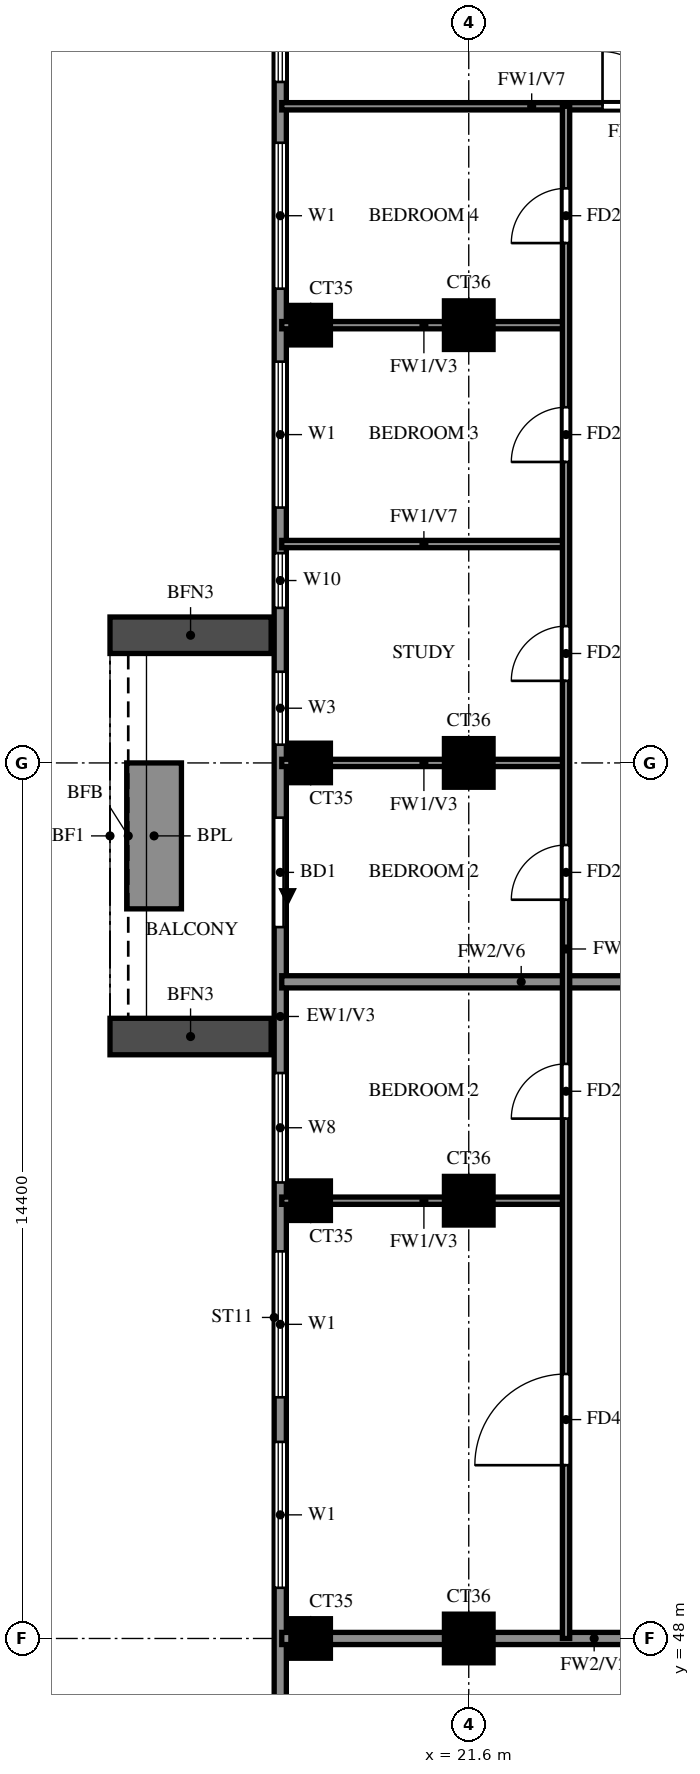
"""IFC4 building model, lengths in metres.
Left out: names, types, materials, properties, quantities, classifications, styles, units other than length and angle.
Written with IfcOpenShell. Run it as: python <this file> out.ifc"""

import sys

from ifc_helpers import new_model, si_unit, direction, frame, frame_2d, origin, origin_2d, place, context, subcontext, project, spatial, rectangle, extrude, source, transform, mapped, element, fill, save


model = new_model("IFC4")
c1 = context("Model", 3, precision=1e-05, world=origin(), true_north=direction((0.0, 1.0)))
c2 = subcontext(c1, "Body", "Model", "MODEL_VIEW")
j1 = project(units=[si_unit("LENGTHUNIT", "METRE"), si_unit("PLANEANGLEUNIT", "RADIAN")], contexts=[c1])
p1 = place(None, origin())
s1 = spatial("IfcSite", under=j1, at=p1, CompositionType="ELEMENT")
p2 = place(p1, origin())
s2 = spatial("IfcBuilding", under=s1, at=p2, CompositionType="ELEMENT")
p3 = place(p2, frame((0.0, 0.0, 232.5)))
s3 = spatial("IfcBuildingStorey", under=s2, at=p3, CompositionType="ELEMENT", Elevation=232.5)
m1 = source(origin(), c2, "Body", "SweptSolid", [
    extrude(rectangle(XDim=0.65, YDim=0.65, at=origin_2d()), origin(), (0.0, 0.0, 1.0), 3.22),
])
p4 = place(p3, frame((19.0, 48.0, 0.0), z_axis=(0.0, 0.0, 1.0), x_axis=(1.0, 0.0, 0.0)))
e1 = element("IfcColumn", 1, at=p4, inside=s3, PredefinedType="COLUMN", context=c2, shape_type="MappedRepresentation", body=[
    mapped(m1, transform((0.0, 0.0, 0.0))),
])
m2 = source(origin(), c2, "Body", "SweptSolid", [
    extrude(rectangle(XDim=0.8, YDim=0.8, at=origin_2d()), origin(), (0.0, 0.0, 1.0), 3.22),
])
p5 = place(p3, frame((21.6, 48.0, 0.0), z_axis=(0.0, 0.0, 1.0), x_axis=(1.0, 0.0, 0.0)))
e2 = element("IfcColumn", 2, at=p5, inside=s3, PredefinedType="COLUMN", context=c2, shape_type="MappedRepresentation", body=[
    mapped(m2, transform((0.0, 0.0, 0.0))),
])
p6 = place(p3, frame((19.0, 55.2, 0.0), z_axis=(0.0, 0.0, 1.0), x_axis=(1.0, 0.0, 0.0)))
e3 = element("IfcColumn", 3, at=p6, inside=s3, PredefinedType="COLUMN", context=c2, shape_type="MappedRepresentation", body=[
    mapped(m1, transform((0.0, 0.0, 0.0))),
])
p7 = place(p3, frame((21.6, 55.2, 0.0), z_axis=(0.0, 0.0, 1.0), x_axis=(1.0, 0.0, 0.0)))
e4 = element("IfcColumn", 4, at=p7, inside=s3, PredefinedType="COLUMN", context=c2, shape_type="MappedRepresentation", body=[
    mapped(m2, transform((0.0, 0.0, 0.0))),
])
p8 = place(p3, frame((19.0, 62.4, 0.0), z_axis=(0.0, 0.0, 1.0), x_axis=(1.0, 0.0, 0.0)))
e5 = element("IfcColumn", 5, at=p8, inside=s3, PredefinedType="COLUMN", context=c2, shape_type="MappedRepresentation", body=[
    mapped(m1, transform((0.0, 0.0, 0.0))),
])
p9 = place(p3, frame((21.6, 62.4, 0.0), z_axis=(0.0, 0.0, 1.0), x_axis=(1.0, 0.0, 0.0)))
e6 = element("IfcColumn", 6, at=p9, inside=s3, PredefinedType="COLUMN", context=c2, shape_type="MappedRepresentation", body=[
    mapped(m2, transform((0.0, 0.0, 0.0))),
])
p10 = place(p3, frame((19.0, 69.6, 0.0), z_axis=(0.0, 0.0, 1.0), x_axis=(1.0, 0.0, 0.0)))
e7 = element("IfcColumn", 7, at=p10, inside=s3, PredefinedType="COLUMN", context=c2, shape_type="MappedRepresentation", body=[
    mapped(m1, transform((0.0, 0.0, 0.0))),
])
p11 = place(p3, frame((21.6, 69.6, 0.0), z_axis=(0.0, 0.0, 1.0), x_axis=(1.0, 0.0, 0.0)))
e8 = element("IfcColumn", 8, at=p11, inside=s3, PredefinedType="COLUMN", context=c2, shape_type="MappedRepresentation", body=[
    mapped(m2, transform((0.0, 0.0, 0.0))),
])
p12 = place(p3, frame((18.5, 76.6, 0.0), z_axis=(0.0, 0.0, 1.0), x_axis=(0.0, -1.0, 0.0)))
e9 = element("IfcWall", 9, at=p12, inside=s3, PredefinedType="SOLIDWALL", context=c2, shape_type="SweptSolid", body=[
    extrude(rectangle(XDim=33.4, YDim=0.2, at=frame_2d((16.7, 0.0))), origin(), (0.0, 0.0, 1.0), 3.22),
])
p13 = place(p12, frame((15.1, 0.0, 0.0)))
e10 = element("IfcOpeningElement", 10, at=p13, cuts=e9, PredefinedType="OPENING", context=c2, shape_type="SweptSolid", body=[
    extrude(rectangle(XDim=1.8, YDim=2.4, at=frame_2d((0.9, 1.2))), frame((0.0, 0.11, 0.0), z_axis=(0.0, -1.0, 0.0), x_axis=(1.0, 0.0, 0.0)), (0.0, 0.0, 1.0), 0.22),
])
p14 = place(p12, frame((29.7, 0.0, 0.6)))
e11 = element("IfcOpeningElement", 11, at=p14, cuts=e9, PredefinedType="OPENING", context=c2, shape_type="SweptSolid", body=[
    extrude(rectangle(XDim=2.4, YDim=2.4, at=frame_2d((1.2, 1.2))), frame((0.0, 0.11, 0.0), z_axis=(0.0, -1.0, 0.0), x_axis=(1.0, 0.0, 0.0)), (0.0, 0.0, 1.0), 0.22),
])
p15 = place(p12, frame((22.233, 0.0, 0.6)))
e12 = element("IfcOpeningElement", 12, at=p15, cuts=e9, PredefinedType="OPENING", context=c2, shape_type="SweptSolid", body=[
    extrude(rectangle(XDim=2.4, YDim=2.4, at=frame_2d((1.2, 1.2))), frame((0.0, 0.11, 0.0), z_axis=(0.0, -1.0, 0.0), x_axis=(1.0, 0.0, 0.0)), (0.0, 0.0, 1.0), 0.22),
])
p16 = place(p12, frame((25.367, 0.0, 0.6)))
e13 = element("IfcOpeningElement", 13, at=p16, cuts=e9, PredefinedType="OPENING", context=c2, shape_type="SweptSolid", body=[
    extrude(rectangle(XDim=2.4, YDim=2.4, at=frame_2d((1.2, 1.2))), frame((0.0, 0.11, 0.0), z_axis=(0.0, -1.0, 0.0), x_axis=(1.0, 0.0, 0.0)), (0.0, 0.0, 1.0), 0.22),
])
p17 = place(p12, frame((19.3, 0.0, 0.6)))
e14 = element("IfcOpeningElement", 14, at=p17, cuts=e9, PredefinedType="OPENING", context=c2, shape_type="SweptSolid", body=[
    extrude(rectangle(XDim=1.8, YDim=2.4, at=frame_2d((0.9, 1.2))), frame((0.0, 0.11, 0.0), z_axis=(0.0, -1.0, 0.0), x_axis=(1.0, 0.0, 0.0)), (0.0, 0.0, 1.0), 0.22),
])
p18 = place(p12, frame((10.75, 0.0, 0.6)))
e15 = element("IfcOpeningElement", 15, at=p18, cuts=e9, PredefinedType="OPENING", context=c2, shape_type="SweptSolid", body=[
    extrude(rectangle(XDim=0.9, YDim=2.4, at=frame_2d((0.45, 1.2))), frame((0.0, 0.11, 0.0), z_axis=(0.0, -1.0, 0.0), x_axis=(1.0, 0.0, 0.0)), (0.0, 0.0, 1.0), 0.22),
])
p19 = place(p12, frame((12.7, 0.0, 0.6)))
e16 = element("IfcOpeningElement", 16, at=p19, cuts=e9, PredefinedType="OPENING", context=c2, shape_type="SweptSolid", body=[
    extrude(rectangle(XDim=1.2, YDim=2.4, at=frame_2d((0.6, 1.2))), frame((0.0, 0.11, 0.0), z_axis=(0.0, -1.0, 0.0), x_axis=(1.0, 0.0, 0.0)), (0.0, 0.0, 1.0), 0.22),
])
p20 = place(p12, frame((7.6, 0.0, 0.6)))
e17 = element("IfcOpeningElement", 17, at=p20, cuts=e9, PredefinedType="OPENING", context=c2, shape_type="SweptSolid", body=[
    extrude(rectangle(XDim=2.4, YDim=2.4, at=frame_2d((1.2, 1.2))), frame((0.0, 0.11, 0.0), z_axis=(0.0, -1.0, 0.0), x_axis=(1.0, 0.0, 0.0)), (0.0, 0.0, 1.0), 0.22),
])
p21 = place(p12, frame((4.0, 0.0, 0.6)))
e18 = element("IfcOpeningElement", 18, at=p21, cuts=e9, PredefinedType="OPENING", context=c2, shape_type="SweptSolid", body=[
    extrude(rectangle(XDim=2.4, YDim=2.4, at=frame_2d((1.2, 1.2))), frame((0.0, 0.11, 0.0), z_axis=(0.0, -1.0, 0.0), x_axis=(1.0, 0.0, 0.0)), (0.0, 0.0, 1.0), 0.22),
])
p22 = place(p12, frame((0.6, 0.0, 0.6)))
e19 = element("IfcOpeningElement", 19, at=p22, cuts=e9, PredefinedType="OPENING", context=c2, shape_type="SweptSolid", body=[
    extrude(rectangle(XDim=2.4, YDim=2.4, at=frame_2d((1.2, 1.2))), frame((0.0, 0.11, 0.0), z_axis=(0.0, -1.0, 0.0), x_axis=(1.0, 0.0, 0.0)), (0.0, 0.0, 1.0), 0.22),
])
for number, where, z_axis, x_axis in (
    (20, (18.35, 64.5, 0.0), (0.0, 0.0, 1.0), (-1.0, 0.0, 0.0)),
    (21, (18.35, 57.9, 0.0), (0.0, 0.0, 1.0), (-1.0, 0.0, 0.0)),
):
    element("IfcWall", number, at=place(p3, frame(where, z_axis=z_axis, x_axis=x_axis)), inside=s3, PredefinedType="SOLIDWALL", context=c2, shape_type="SweptSolid", body=[
        extrude(rectangle(XDim=2.65, YDim=0.6, at=frame_2d((1.325, 0.0))), origin(), (0.0, 0.0, 1.0), 2.85),
    ])
p23 = place(p3, frame((16.425, 62.4, 0.0), z_axis=(0.0, 0.0, 1.0), x_axis=(0.0, -1.0, 0.0)))
e22 = element("IfcWall", 22, at=p23, inside=s3, PredefinedType="SOLIDWALL", context=c2, shape_type="SweptSolid", body=[
    extrude(rectangle(XDim=2.4, YDim=0.9, at=frame_2d((1.2, 0.0))), origin(), (0.0, 0.0, 1.0), 0.9),
])
p24 = place(p3, frame((18.525, 48.0, 0.0), z_axis=(0.0, 0.0, 1.0), x_axis=(1.0, 0.0, 0.0)))
e23 = element("IfcWall", 23, at=p24, inside=s3, PredefinedType="SOLIDWALL", context=c2, shape_type="SweptSolid", body=[
    extrude(rectangle(XDim=10.275, YDim=0.2, at=frame_2d((5.138, 0.0))), origin(), (0.0, 0.0, 1.0), 3.22),
])
p25 = place(p3, frame((18.525, 58.8, 0.0), z_axis=(0.0, 0.0, 1.0), x_axis=(1.0, 0.0, 0.0)))
e24 = element("IfcWall", 24, at=p25, inside=s3, PredefinedType="SOLIDWALL", context=c2, shape_type="SweptSolid", body=[
    extrude(rectangle(XDim=7.875, YDim=0.2, at=frame_2d((3.938, 0.0))), origin(), (0.0, 0.0, 1.0), 2.32),
])
for number, where, z_axis, x_axis in (
    (25, (18.525, 55.2, 0.0), (0.0, 0.0, 1.0), (1.0, 0.0, 0.0)),
    (26, (18.525, 62.4, 0.0), (0.0, 0.0, 1.0), (1.0, 0.0, 0.0)),
):
    element("IfcWall", number, at=place(p3, frame(where, z_axis=z_axis, x_axis=x_axis)), inside=s3, PredefinedType="PARTITIONING", context=c2, shape_type="SweptSolid", body=[
        extrude(rectangle(XDim=4.675, YDim=0.12, at=frame_2d((2.337, 0.0))), origin(), (0.0, 0.0, 1.0), 3.22),
    ])
p26 = place(p3, frame((18.525, 66.0, 0.0), z_axis=(0.0, 0.0, 1.0), x_axis=(1.0, 0.0, 0.0)))
e27 = element("IfcWall", 27, at=p26, inside=s3, PredefinedType="PARTITIONING", context=c2, shape_type="SweptSolid", body=[
    extrude(rectangle(XDim=4.675, YDim=0.12, at=frame_2d((2.337, 0.0))), origin(), (0.0, 0.0, 1.0), 2.32),
])
p27 = place(p3, frame((18.525, 69.6, 0.0), z_axis=(0.0, 0.0, 1.0), x_axis=(1.0, 0.0, 0.0)))
e28 = element("IfcWall", 28, at=p27, inside=s3, PredefinedType="PARTITIONING", context=c2, shape_type="SweptSolid", body=[
    extrude(rectangle(XDim=4.675, YDim=0.12, at=frame_2d((2.337, 0.0))), origin(), (0.0, 0.0, 1.0), 3.22),
])
p28 = place(p3, frame((18.525, 73.2, 0.0), z_axis=(0.0, 0.0, 1.0), x_axis=(1.0, 0.0, 0.0)))
e29 = element("IfcWall", 29, at=p28, inside=s3, PredefinedType="PARTITIONING", context=c2, shape_type="SweptSolid", body=[
    extrude(rectangle(XDim=10.275, YDim=0.12, at=frame_2d((5.138, 0.0))), origin(), (0.0, 0.0, 1.0), 2.32),
])
p29 = place(p28, frame((5.275, 0.0, 0.0)))
e30 = element("IfcOpeningElement", 30, at=p29, cuts=e29, PredefinedType="OPENING", context=c2, shape_type="SweptSolid", body=[
    extrude(rectangle(XDim=0.9, YDim=2.1, at=frame_2d((0.45, 1.05))), frame((0.0, 0.07, 0.0), z_axis=(0.0, -1.0, 0.0), x_axis=(1.0, 0.0, 0.0)), (0.0, 0.0, 1.0), 0.14),
])
p30 = place(p3, frame((23.2, 48.0, 0.0), z_axis=(0.0, 0.0, 1.0), x_axis=(0.0, 1.0, 0.0)))
e31 = element("IfcWall", 31, at=p30, inside=s3, PredefinedType="PARTITIONING", context=c2, shape_type="SweptSolid", body=[
    extrude(rectangle(XDim=25.2, YDim=0.12, at=frame_2d((12.6, 0.0))), origin(), (0.0, 0.0, 1.0), 3.22),
])
p31 = place(p30, frame((2.85, 0.0, 0.0)))
e32 = element("IfcOpeningElement", 32, at=p31, cuts=e31, PredefinedType="OPENING", context=c2, shape_type="SweptSolid", body=[
    extrude(rectangle(XDim=1.5, YDim=2.1, at=frame_2d((0.75, 1.05))), frame((0.0, 0.07, 0.0), z_axis=(0.0, -1.0, 0.0), x_axis=(1.0, 0.0, 0.0)), (0.0, 0.0, 1.0), 0.14),
])
p32 = place(p30, frame((8.55, 0.0, 0.0)))
e33 = element("IfcOpeningElement", 33, at=p32, cuts=e31, PredefinedType="OPENING", context=c2, shape_type="SweptSolid", body=[
    extrude(rectangle(XDim=0.9, YDim=2.1, at=frame_2d((0.45, 1.05))), frame((0.0, 0.07, 0.0), z_axis=(0.0, -1.0, 0.0), x_axis=(1.0, 0.0, 0.0)), (0.0, 0.0, 1.0), 0.14),
])
p33 = place(p30, frame((12.15, 0.0, 0.0)))
e34 = element("IfcOpeningElement", 34, at=p33, cuts=e31, PredefinedType="OPENING", context=c2, shape_type="SweptSolid", body=[
    extrude(rectangle(XDim=0.9, YDim=2.1, at=frame_2d((0.45, 1.05))), frame((0.0, 0.07, 0.0), z_axis=(0.0, -1.0, 0.0), x_axis=(1.0, 0.0, 0.0)), (0.0, 0.0, 1.0), 0.14),
])
p34 = place(p30, frame((15.75, 0.0, 0.0)))
e35 = element("IfcOpeningElement", 35, at=p34, cuts=e31, PredefinedType="OPENING", context=c2, shape_type="SweptSolid", body=[
    extrude(rectangle(XDim=0.9, YDim=2.1, at=frame_2d((0.45, 1.05))), frame((0.0, 0.07, 0.0), z_axis=(0.0, -1.0, 0.0), x_axis=(1.0, 0.0, 0.0)), (0.0, 0.0, 1.0), 0.14),
])
p35 = place(p30, frame((19.35, 0.0, 0.0)))
e36 = element("IfcOpeningElement", 36, at=p35, cuts=e31, PredefinedType="OPENING", context=c2, shape_type="SweptSolid", body=[
    extrude(rectangle(XDim=0.9, YDim=2.1, at=frame_2d((0.45, 1.05))), frame((0.0, 0.07, 0.0), z_axis=(0.0, -1.0, 0.0), x_axis=(1.0, 0.0, 0.0)), (0.0, 0.0, 1.0), 0.14),
])
p36 = place(p30, frame((22.95, 0.0, 0.0)))
e37 = element("IfcOpeningElement", 37, at=p36, cuts=e31, PredefinedType="OPENING", context=c2, shape_type="SweptSolid", body=[
    extrude(rectangle(XDim=0.9, YDim=2.1, at=frame_2d((0.45, 1.05))), frame((0.0, 0.07, 0.0), z_axis=(0.0, -1.0, 0.0), x_axis=(1.0, 0.0, 0.0)), (0.0, 0.0, 1.0), 0.14),
])
p37 = place(p13, origin())
e38 = element("IfcDoor", 38, at=p37, inside=s3, OperationType="DOUBLE_DOOR_SLIDING", PredefinedType="DOOR", context=c2, shape_type="SweptSolid", body=[
    extrude(rectangle(XDim=1.8, YDim=2.4, at=frame_2d((0.9, 1.2))), frame((0.0, 0.025, 0.0), z_axis=(0.0, -1.0, 0.0), x_axis=(1.0, 0.0, 0.0)), (0.0, 0.0, 1.0), 0.05),
])
fill(e10, e38)
p38 = place(p15, origin())
e39 = element("IfcWindow", 39, at=p38, inside=s3, PartitioningType="DOUBLE_PANEL_VERTICAL", PredefinedType="WINDOW", context=c2, shape_type="SweptSolid", body=[
    extrude(rectangle(XDim=2.4, YDim=2.4, at=frame_2d((1.2, 1.2))), frame((0.0, 0.03, 0.0), z_axis=(0.0, -1.0, 0.0), x_axis=(1.0, 0.0, 0.0)), (0.0, 0.0, 1.0), 0.06),
])
fill(e12, e39)
p39 = place(p16, origin())
e40 = element("IfcWindow", 40, at=p39, inside=s3, PartitioningType="DOUBLE_PANEL_VERTICAL", PredefinedType="WINDOW", context=c2, shape_type="SweptSolid", body=[
    extrude(rectangle(XDim=2.4, YDim=2.4, at=frame_2d((1.2, 1.2))), frame((0.0, 0.03, 0.0), z_axis=(0.0, -1.0, 0.0), x_axis=(1.0, 0.0, 0.0)), (0.0, 0.0, 1.0), 0.06),
])
fill(e13, e40)
p40 = place(p17, origin())
e41 = element("IfcWindow", 41, at=p40, inside=s3, PartitioningType="DOUBLE_PANEL_VERTICAL", PredefinedType="WINDOW", context=c2, shape_type="SweptSolid", body=[
    extrude(rectangle(XDim=1.8, YDim=2.4, at=frame_2d((0.9, 1.2))), frame((0.0, 0.03, 0.0), z_axis=(0.0, -1.0, 0.0), x_axis=(1.0, 0.0, 0.0)), (0.0, 0.0, 1.0), 0.06),
])
fill(e14, e41)
p41 = place(p18, origin())
e42 = element("IfcWindow", 42, at=p41, inside=s3, PartitioningType="SINGLE_PANEL", PredefinedType="WINDOW", context=c2, shape_type="SweptSolid", body=[
    extrude(rectangle(XDim=0.9, YDim=2.4, at=frame_2d((0.45, 1.2))), frame((0.0, 0.03, 0.0), z_axis=(0.0, -1.0, 0.0), x_axis=(1.0, 0.0, 0.0)), (0.0, 0.0, 1.0), 0.06),
])
fill(e15, e42)
p42 = place(p19, origin())
e43 = element("IfcWindow", 43, at=p42, inside=s3, PartitioningType="SINGLE_PANEL", PredefinedType="WINDOW", context=c2, shape_type="SweptSolid", body=[
    extrude(rectangle(XDim=1.2, YDim=2.4, at=frame_2d((0.6, 1.2))), frame((0.0, 0.03, 0.0), z_axis=(0.0, -1.0, 0.0), x_axis=(1.0, 0.0, 0.0)), (0.0, 0.0, 1.0), 0.06),
])
fill(e16, e43)
p43 = place(p20, origin())
e44 = element("IfcWindow", 44, at=p43, inside=s3, PartitioningType="DOUBLE_PANEL_VERTICAL", PredefinedType="WINDOW", context=c2, shape_type="SweptSolid", body=[
    extrude(rectangle(XDim=2.4, YDim=2.4, at=frame_2d((1.2, 1.2))), frame((0.0, 0.03, 0.0), z_axis=(0.0, -1.0, 0.0), x_axis=(1.0, 0.0, 0.0)), (0.0, 0.0, 1.0), 0.06),
])
fill(e17, e44)
p44 = place(p21, origin())
e45 = element("IfcWindow", 45, at=p44, inside=s3, PartitioningType="DOUBLE_PANEL_VERTICAL", PredefinedType="WINDOW", context=c2, shape_type="SweptSolid", body=[
    extrude(rectangle(XDim=2.4, YDim=2.4, at=frame_2d((1.2, 1.2))), frame((0.0, 0.03, 0.0), z_axis=(0.0, -1.0, 0.0), x_axis=(1.0, 0.0, 0.0)), (0.0, 0.0, 1.0), 0.06),
])
fill(e18, e45)
p45 = place(p22, origin())
e46 = element("IfcWindow", 46, at=p45, inside=s3, PartitioningType="DOUBLE_PANEL_VERTICAL", PredefinedType="WINDOW", context=c2, shape_type="SweptSolid", body=[
    extrude(rectangle(XDim=2.4, YDim=2.4, at=frame_2d((1.2, 1.2))), frame((0.0, 0.03, 0.0), z_axis=(0.0, -1.0, 0.0), x_axis=(1.0, 0.0, 0.0)), (0.0, 0.0, 1.0), 0.06),
])
fill(e19, e46)
p46 = place(p31, origin())
e47 = element("IfcDoor", 47, at=p46, inside=s3, OperationType="SINGLE_SWING_LEFT", PredefinedType="DOOR", context=c2, shape_type="SweptSolid", body=[
    extrude(rectangle(XDim=1.5, YDim=2.1, at=frame_2d((0.75, 1.05))), frame((0.0, 0.025, 0.0), z_axis=(0.0, -1.0, 0.0), x_axis=(1.0, 0.0, 0.0)), (0.0, 0.0, 1.0), 0.05),
])
fill(e32, e47)
p47 = place(p32, origin())
e48 = element("IfcDoor", 48, at=p47, inside=s3, OperationType="SINGLE_SWING_LEFT", PredefinedType="DOOR", context=c2, shape_type="SweptSolid", body=[
    extrude(rectangle(XDim=0.9, YDim=2.1, at=frame_2d((0.45, 1.05))), frame((0.0, 0.025, 0.0), z_axis=(0.0, -1.0, 0.0), x_axis=(1.0, 0.0, 0.0)), (0.0, 0.0, 1.0), 0.05),
])
fill(e33, e48)
p48 = place(p33, origin())
e49 = element("IfcDoor", 49, at=p48, inside=s3, OperationType="SINGLE_SWING_LEFT", PredefinedType="DOOR", context=c2, shape_type="SweptSolid", body=[
    extrude(rectangle(XDim=0.9, YDim=2.1, at=frame_2d((0.45, 1.05))), frame((0.0, 0.025, 0.0), z_axis=(0.0, -1.0, 0.0), x_axis=(1.0, 0.0, 0.0)), (0.0, 0.0, 1.0), 0.05),
])
fill(e34, e49)
p49 = place(p34, origin())
e50 = element("IfcDoor", 50, at=p49, inside=s3, OperationType="SINGLE_SWING_RIGHT", PredefinedType="DOOR", context=c2, shape_type="SweptSolid", body=[
    extrude(rectangle(XDim=0.9, YDim=2.1, at=frame_2d((0.45, 1.05))), frame((0.0, 0.025, 0.0), z_axis=(0.0, -1.0, 0.0), x_axis=(1.0, 0.0, 0.0)), (0.0, 0.0, 1.0), 0.05),
])
fill(e35, e50)
p50 = place(p35, origin())
e51 = element("IfcDoor", 51, at=p50, inside=s3, OperationType="SINGLE_SWING_LEFT", PredefinedType="DOOR", context=c2, shape_type="SweptSolid", body=[
    extrude(rectangle(XDim=0.9, YDim=2.1, at=frame_2d((0.45, 1.05))), frame((0.0, 0.025, 0.0), z_axis=(0.0, -1.0, 0.0), x_axis=(1.0, 0.0, 0.0)), (0.0, 0.0, 1.0), 0.05),
])
fill(e36, e51)
p51 = place(p36, origin())
e52 = element("IfcDoor", 52, at=p51, inside=s3, OperationType="SINGLE_SWING_LEFT", PredefinedType="DOOR", context=c2, shape_type="SweptSolid", body=[
    extrude(rectangle(XDim=0.9, YDim=2.1, at=frame_2d((0.45, 1.05))), frame((0.0, 0.025, 0.0), z_axis=(0.0, -1.0, 0.0), x_axis=(1.0, 0.0, 0.0)), (0.0, 0.0, 1.0), 0.05),
])
fill(e37, e52)
p52 = place(p29, origin())
e53 = element("IfcDoor", 53, at=p52, inside=s3, OperationType="SINGLE_SWING_RIGHT", PredefinedType="DOOR", context=c2, shape_type="SweptSolid", body=[
    extrude(rectangle(XDim=0.9, YDim=2.1, at=frame_2d((0.45, 1.05))), frame((0.0, 0.025, 0.0), z_axis=(0.0, -1.0, 0.0), x_axis=(1.0, 0.0, 0.0)), (0.0, 0.0, 1.0), 0.05),
])
fill(e30, e53)
save(model, sys.argv[1])
